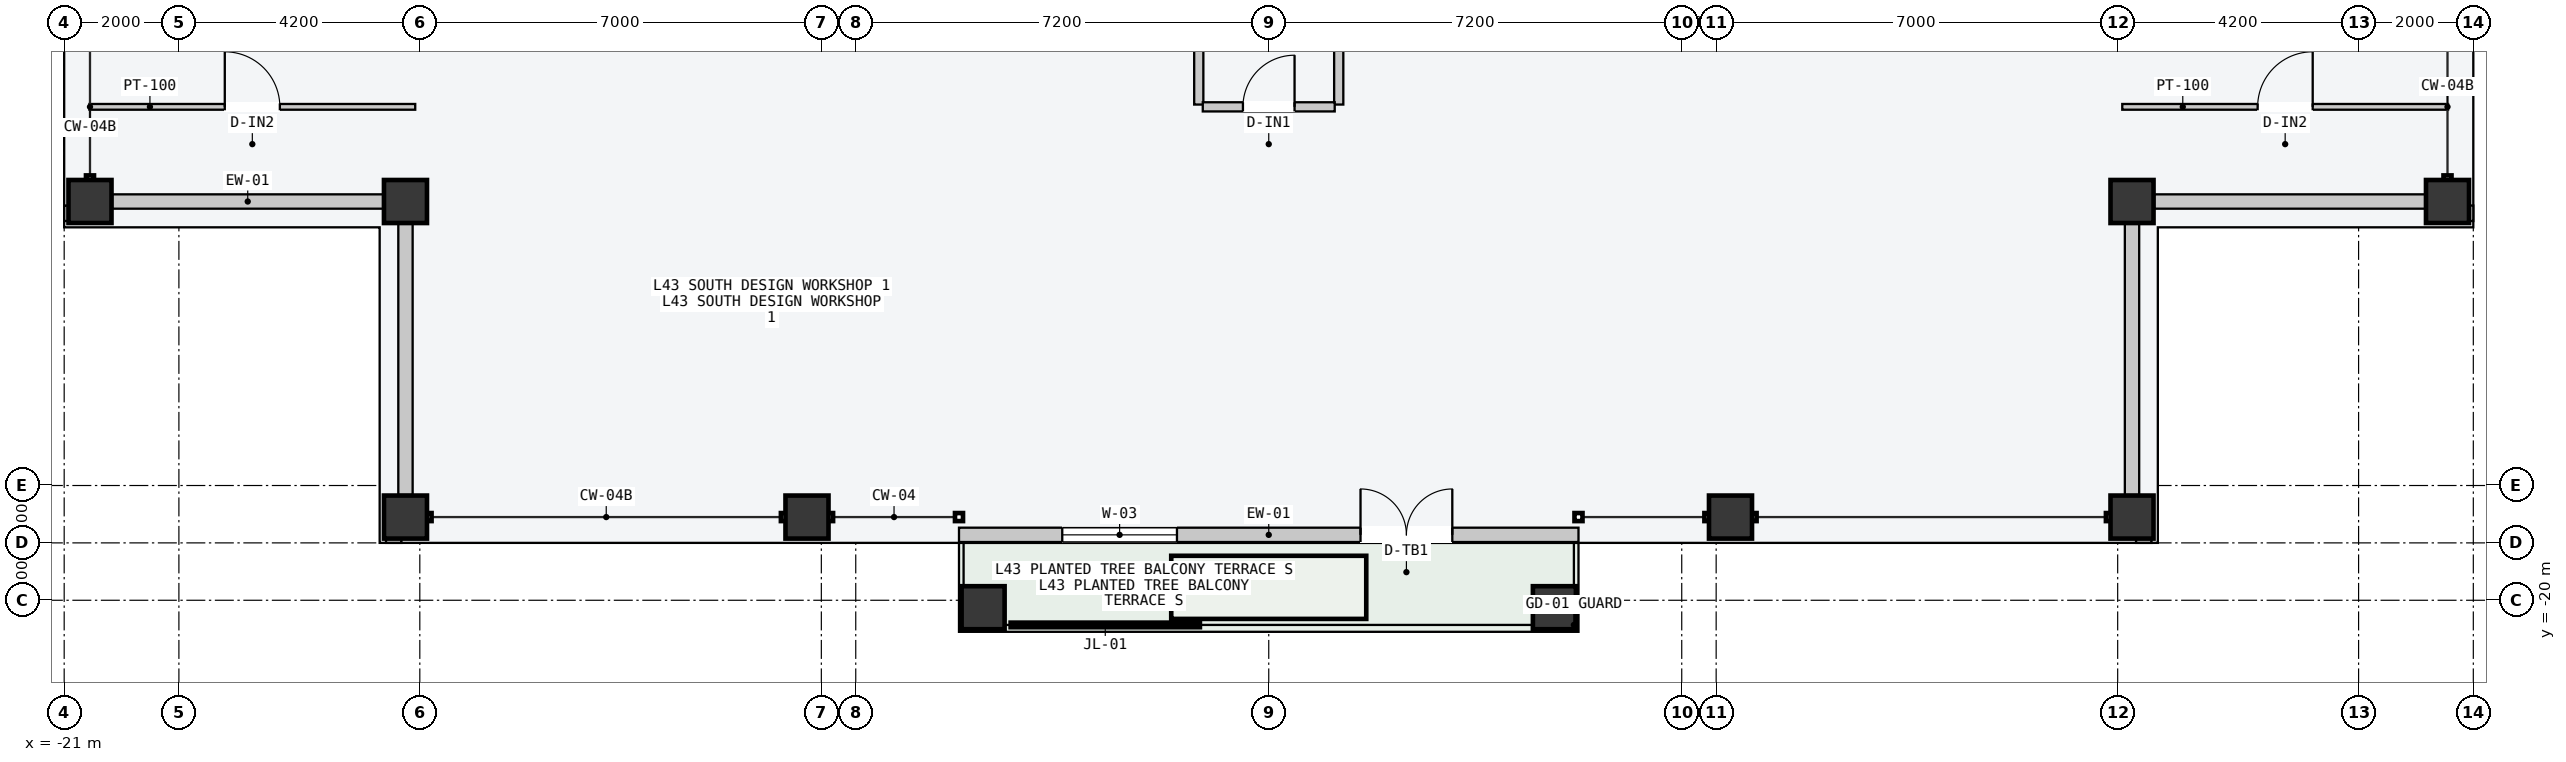
"""IFC4 building model, lengths in metres.
Left out: names, types, materials, properties, quantities, classifications, styles, units other than length and angle.
Written with IfcOpenShell. Run it as: python <this file> out.ifc"""

import sys

from ifc_helpers import new_model, si_unit, direction, frame, frame_2d, origin, origin_2d, place, context, subcontext, project, spatial, rectangle, hollow_rectangle, extrude, element, fill, save


model = new_model("IFC4")
c1 = context("Model", 3, precision=1e-05, world=origin(), true_north=direction((0.0, 1.0)))
c2 = subcontext(c1, "Body", "Model", "MODEL_VIEW")
j1 = project(units=[si_unit("LENGTHUNIT", "METRE"), si_unit("PLANEANGLEUNIT", "RADIAN")], contexts=[c1])
p1 = place(None, origin())
s1 = spatial("IfcSite", under=j1, at=p1, CompositionType="ELEMENT")
p2 = place(p1, origin())
s2 = spatial("IfcBuilding", under=s1, at=p2, CompositionType="ELEMENT")
p3 = place(p2, frame((0.0, 0.0, 165.9)))
s3 = spatial("IfcBuildingStorey", under=s2, at=p3, CompositionType="ELEMENT", Elevation=165.9)
for number, where, z_axis, x_axis in (
    (1, (-15.05, -18.55, 0.0), (0.0, 0.0, 1.0), (1.0, 0.0, 0.0)),
    (2, (-8.05, -18.55, 0.0), (0.0, 0.0, 1.0), (1.0, 0.0, 0.0)),
    (3, (8.05, -18.55, 0.0), (0.0, 0.0, 1.0), (1.0, 0.0, 0.0)),
    (4, (15.05, -18.55, 0.0), (0.0, 0.0, 1.0), (1.0, 0.0, 0.0)),
    (5, (-20.55, -13.05, 0.0), (0.0, 0.0, 1.0), (0.0, 1.0, 0.0)),
    (6, (20.55, -13.05, 0.0), (0.0, 0.0, 1.0), (0.0, 1.0, 0.0)),
    (7, (15.05, -13.05, 0.0), (0.0, 0.0, 1.0), (1.0, 0.0, 0.0)),
    (8, (-15.05, -13.05, 0.0), (0.0, 0.0, 1.0), (1.0, 0.0, 0.0)),
    (9, (-4.98, -20.13, 0.0), (0.0, 0.0, 1.0), (1.0, 0.0, 0.0)),
    (10, (4.98, -20.13, 0.0), (0.0, 0.0, 1.0), (1.0, 0.0, 0.0)),
):
    element("IfcColumn", number, at=place(p3, frame(where, z_axis=z_axis, x_axis=x_axis)), inside=s3, PredefinedType="COLUMN", context=c2, shape_type="SweptSolid", body=[
        extrude(hollow_rectangle(XDim=0.75, YDim=0.75, WallThickness=0.032, at=origin_2d()), origin(), (0.0, 0.0, 1.0), 3.6),
    ])
p4 = place(p3, frame((-5.4, -18.86, 0.0), z_axis=(0.0, 0.0, 1.0), x_axis=(1.0, 0.0, 0.0)))
e11 = element("IfcWall", 11, at=p4, inside=s3, PredefinedType="STANDARD", context=c2, shape_type="SweptSolid", body=[
    extrude(rectangle(XDim=10.8, YDim=0.25, at=frame_2d((5.4, 0.0))), origin(), (0.0, 0.0, 1.0), 3.4),
])
p5 = place(p4, frame((7.0, 0.0, 0.0)))
e12 = element("IfcOpeningElement", 12, at=p5, cuts=e11, PredefinedType="OPENING", context=c2, shape_type="SweptSolid", body=[
    extrude(rectangle(XDim=1.6, YDim=2.2, at=frame_2d((0.8, 1.1))), frame((0.0, 0.135, 0.0), z_axis=(0.0, -1.0, 0.0), x_axis=(1.0, 0.0, 0.0)), (0.0, 0.0, 1.0), 0.27),
])
p6 = place(p4, frame((1.8, 0.0, 0.85)))
e13 = element("IfcOpeningElement", 13, at=p6, cuts=e11, PredefinedType="OPENING", context=c2, shape_type="SweptSolid", body=[
    extrude(rectangle(XDim=2.0, YDim=2.1, at=frame_2d((1.0, 1.05))), frame((0.0, 0.135, 0.0), z_axis=(0.0, -1.0, 0.0), x_axis=(1.0, 0.0, 0.0)), (0.0, 0.0, 1.0), 0.27),
])
for number, where, z_axis, x_axis in (
    (14, (-20.165, -13.05, 0.0), (0.0, 0.0, 1.0), (1.0, 0.0, 0.0)),
    (15, (-15.05, -18.165, 0.0), (0.0, 0.0, 1.0), (0.0, 1.0, 0.0)),
    (16, (15.435, -13.05, 0.0), (0.0, 0.0, 1.0), (1.0, 0.0, 0.0)),
    (17, (15.05, -18.165, 0.0), (0.0, 0.0, 1.0), (0.0, 1.0, 0.0)),
):
    element("IfcWall", number, at=place(p3, frame(where, z_axis=z_axis, x_axis=x_axis)), inside=s3, PredefinedType="STANDARD", context=c2, shape_type="SweptSolid", body=[
        extrude(rectangle(XDim=4.73, YDim=0.25, at=frame_2d((2.365, 0.0))), origin(), (0.0, 0.0, 1.0), 2.75),
    ])
for number, where, z_axis, x_axis in (
    (18, (-15.39, -18.89, 0.0), (0.0, 0.0, 1.0), (1.0, 0.0, 0.0)),
    (19, (-20.89, -13.39, 0.0), (0.0, 0.0, 1.0), (0.0, 1.0, 0.0)),
    (20, (15.12, -18.89, 0.0), (0.0, 0.0, 1.0), (1.0, 0.0, 0.0)),
    (21, (20.89, -13.39, 0.0), (0.0, 0.0, 1.0), (0.0, 1.0, 0.0)),
):
    element("IfcWall", number, at=place(p3, frame(where, z_axis=z_axis, x_axis=x_axis)), inside=s3, PredefinedType="PARAPET", context=c2, shape_type="SweptSolid", body=[
        extrude(rectangle(XDim=0.27, YDim=0.22, at=frame_2d((0.135, 0.0))), origin(), (0.0, 0.0, 1.0), 1.2),
    ])
p7 = place(p3, frame((-1.22, -11.36, 0.0), z_axis=(0.0, 0.0, 1.0), x_axis=(0.0, 1.0, 0.0)))
e22 = element("IfcWall", 22, at=p7, inside=s3, PredefinedType="PARTITIONING", context=c2, shape_type="SweptSolid", body=[
    extrude(rectangle(XDim=5.68, YDim=0.16, at=frame_2d((2.84, 0.0))), origin(), (0.0, 0.0, 1.0), 3.4),
])
p8 = place(p7, frame((1.15, 0.0, 0.0)))
e23 = element("IfcOpeningElement", 23, at=p8, cuts=e22, PredefinedType="OPENING", context=c2, shape_type="SweptSolid", body=[
    extrude(rectangle(XDim=0.96, YDim=2.18, at=frame_2d((0.48, 1.09))), frame((0.0, 0.09, 0.0), z_axis=(0.0, -1.0, 0.0), x_axis=(1.0, 0.0, 0.0)), (0.0, 0.0, 1.0), 0.18),
])
p9 = place(p3, frame((1.22, -11.36, 0.0), z_axis=(0.0, 0.0, 1.0), x_axis=(0.0, 1.0, 0.0)))
e24 = element("IfcWall", 24, at=p9, inside=s3, PredefinedType="PARTITIONING", context=c2, shape_type="SweptSolid", body=[
    extrude(rectangle(XDim=5.68, YDim=0.16, at=frame_2d((2.84, 0.0))), origin(), (0.0, 0.0, 1.0), 3.4),
])
p10 = place(p9, frame((1.15, 0.0, 0.0)))
e25 = element("IfcOpeningElement", 25, at=p10, cuts=e24, PredefinedType="OPENING", context=c2, shape_type="SweptSolid", body=[
    extrude(rectangle(XDim=0.96, YDim=2.18, at=frame_2d((0.48, 1.09))), frame((0.0, 0.09, 0.0), z_axis=(0.0, -1.0, 0.0), x_axis=(1.0, 0.0, 0.0)), (0.0, 0.0, 1.0), 0.18),
])
p11 = place(p3, frame((-1.15, -11.4, 0.0), z_axis=(0.0, 0.0, 1.0), x_axis=(1.0, 0.0, 0.0)))
e26 = element("IfcWall", 26, at=p11, inside=s3, PredefinedType="PARTITIONING", context=c2, shape_type="SweptSolid", body=[
    extrude(rectangle(XDim=2.3, YDim=0.16, at=frame_2d((1.15, 0.0))), origin(), (0.0, 0.0, 1.0), 3.4),
])
p12 = place(p11, frame((0.7, 0.0, 0.0)))
e27 = element("IfcOpeningElement", 27, at=p12, cuts=e26, PredefinedType="OPENING", context=c2, shape_type="SweptSolid", body=[
    extrude(rectangle(XDim=0.9, YDim=2.15, at=frame_2d((0.45, 1.075))), frame((0.0, 0.09, 0.0), z_axis=(0.0, -1.0, 0.0), x_axis=(1.0, 0.0, 0.0)), (0.0, 0.0, 1.0), 0.18),
])
p13 = place(p3, frame((-20.56, -11.4, 0.0), z_axis=(0.0, 0.0, 1.0), x_axis=(1.0, 0.0, 0.0)))
e28 = element("IfcWall", 28, at=p13, inside=s3, PredefinedType="PARTITIONING", context=c2, shape_type="SweptSolid", body=[
    extrude(rectangle(XDim=5.68, YDim=0.1, at=frame_2d((2.84, 0.0))), origin(), (0.0, 0.0, 1.0), 3.4),
])
p14 = place(p13, frame((2.36, 0.0, 0.0)))
e29 = element("IfcOpeningElement", 29, at=p14, cuts=e28, PredefinedType="OPENING", context=c2, shape_type="SweptSolid", body=[
    extrude(rectangle(XDim=0.96, YDim=2.18, at=frame_2d((0.48, 1.09))), frame((0.0, 0.06, 0.0), z_axis=(0.0, -1.0, 0.0), x_axis=(1.0, 0.0, 0.0)), (0.0, 0.0, 1.0), 0.12),
])
p15 = place(p3, frame((14.88, -11.4, 0.0), z_axis=(0.0, 0.0, 1.0), x_axis=(1.0, 0.0, 0.0)))
e30 = element("IfcWall", 30, at=p15, inside=s3, PredefinedType="PARTITIONING", context=c2, shape_type="SweptSolid", body=[
    extrude(rectangle(XDim=5.68, YDim=0.1, at=frame_2d((2.84, 0.0))), origin(), (0.0, 0.0, 1.0), 3.4),
])
p16 = place(p15, frame((2.36, 0.0, 0.0)))
e31 = element("IfcOpeningElement", 31, at=p16, cuts=e30, PredefinedType="OPENING", context=c2, shape_type="SweptSolid", body=[
    extrude(rectangle(XDim=0.96, YDim=2.18, at=frame_2d((0.48, 1.09))), frame((0.0, 0.06, 0.0), z_axis=(0.0, -1.0, 0.0), x_axis=(1.0, 0.0, 0.0)), (0.0, 0.0, 1.0), 0.12),
])
p17 = place(p5, origin())
e32 = element("IfcDoor", 32, at=p17, inside=s3, OperationType="DOUBLE_DOOR_SINGLE_SWING", PredefinedType="DOOR", context=c2, shape_type="SweptSolid", body=[
    extrude(rectangle(XDim=1.6, YDim=2.2, at=frame_2d((0.8, 1.1))), frame((0.0, 0.025, 0.0), z_axis=(0.0, -1.0, 0.0), x_axis=(1.0, 0.0, 0.0)), (0.0, 0.0, 1.0), 0.05),
])
fill(e12, e32)
p18 = place(p6, origin())
e33 = element("IfcWindow", 33, at=p18, inside=s3, PartitioningType="SINGLE_PANEL", PredefinedType="WINDOW", context=c2, shape_type="SweptSolid", body=[
    extrude(rectangle(XDim=2.0, YDim=2.1, at=frame_2d((1.0, 1.05))), frame((0.0, 0.03, 0.0), z_axis=(0.0, -1.0, 0.0), x_axis=(1.0, 0.0, 0.0)), (0.0, 0.0, 1.0), 0.06),
])
fill(e13, e33)
p19 = place(p12, origin())
e34 = element("IfcDoor", 34, at=p19, inside=s3, OperationType="SINGLE_SWING_RIGHT", PredefinedType="DOOR", context=c2, shape_type="SweptSolid", body=[
    extrude(rectangle(XDim=0.9, YDim=2.15, at=frame_2d((0.45, 1.075))), frame((0.0, 0.025, 0.0), z_axis=(0.0, -1.0, 0.0), x_axis=(1.0, 0.0, 0.0)), (0.0, 0.0, 1.0), 0.05),
])
fill(e27, e34)
p20 = place(p14, origin())
e35 = element("IfcDoor", 35, at=p20, inside=s3, OperationType="SINGLE_SWING_LEFT", PredefinedType="DOOR", context=c2, shape_type="SweptSolid", body=[
    extrude(rectangle(XDim=0.96, YDim=2.18, at=frame_2d((0.48, 1.09))), frame((0.0, 0.025, 0.0), z_axis=(0.0, -1.0, 0.0), x_axis=(1.0, 0.0, 0.0)), (0.0, 0.0, 1.0), 0.05),
])
fill(e29, e35)
p21 = place(p16, origin())
e36 = element("IfcDoor", 36, at=p21, inside=s3, OperationType="SINGLE_SWING_RIGHT", PredefinedType="DOOR", context=c2, shape_type="SweptSolid", body=[
    extrude(rectangle(XDim=0.96, YDim=2.18, at=frame_2d((0.48, 1.09))), frame((0.0, 0.025, 0.0), z_axis=(0.0, -1.0, 0.0), x_axis=(1.0, 0.0, 0.0)), (0.0, 0.0, 1.0), 0.05),
])
fill(e31, e36)
save(model, sys.argv[1])
